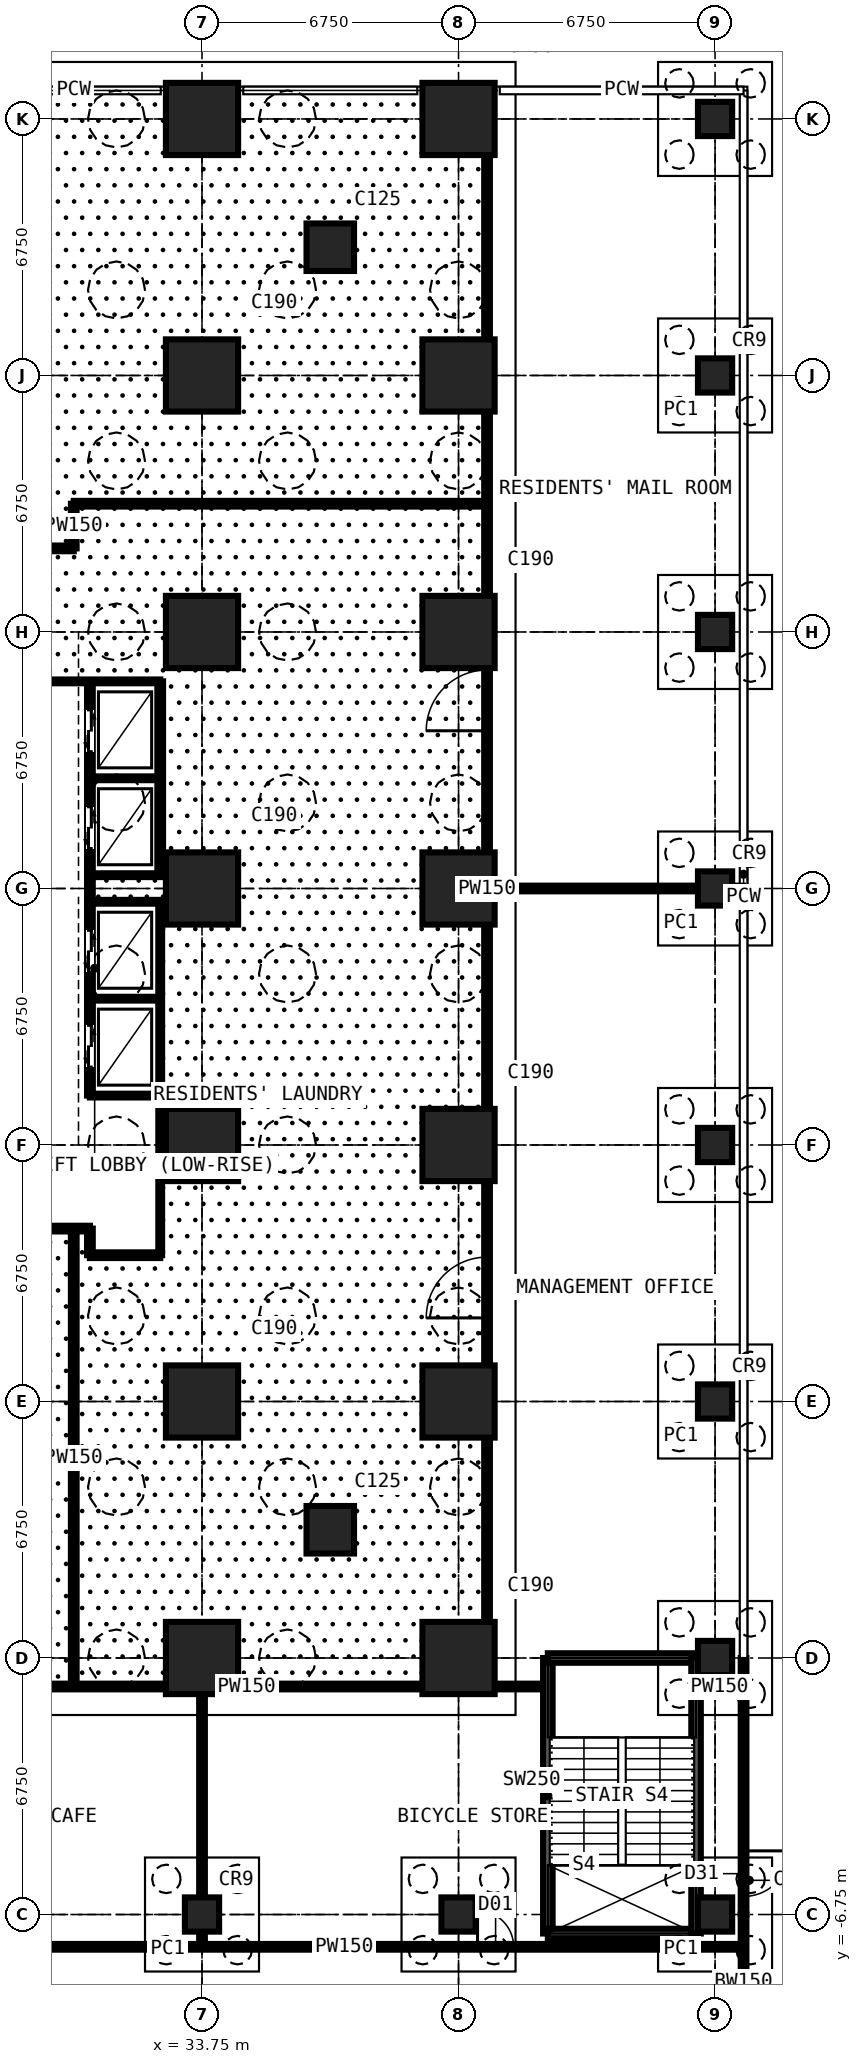
"""IFC4 building model, lengths in metres.
Left out: names, types, materials, properties, quantities, classifications, styles, units other than length and angle.
Written with IfcOpenShell. Run it as: python <this file> out.ifc"""

import sys

from ifc_helpers import new_model, si_unit, direction, frame, frame_2d, origin, origin_2d, place, context, subcontext, project, spatial, rectangle, circle, extrude, element, fill, save


model = new_model("IFC4")
c1 = context("Model", 3, precision=1e-05, world=origin(), true_north=direction((0.0, 1.0)))
c2 = subcontext(c1, "Body", "Model", "MODEL_VIEW")
j1 = project(units=[si_unit("LENGTHUNIT", "METRE"), si_unit("PLANEANGLEUNIT", "RADIAN")], contexts=[c1])
p1 = place(None, origin())
s1 = spatial("IfcSite", under=j1, at=p1, CompositionType="ELEMENT")
p2 = place(p1, origin())
s2 = spatial("IfcBuilding", under=s1, at=p2, CompositionType="ELEMENT")
p3 = place(p2, origin())
s3 = spatial("IfcBuildingStorey", under=s2, at=p3, CompositionType="ELEMENT", Elevation=0.0)
p4 = place(p3, frame((33.75, -6.75, 0.0), z_axis=(0.0, 0.0, 1.0), x_axis=(1.0, 0.0, 0.0)))
e1 = element("IfcColumn", 1, at=p4, inside=s3, PredefinedType="COLUMN", context=c2, shape_type="SweptSolid", body=[
    extrude(circle(Radius=0.45, at=origin_2d()), origin(), (0.0, 0.0, 1.0), 4.5),
])
for number, where, z_axis, x_axis in (
    (2, (33.75, 0.0, 0.0), (0.0, 0.0, 1.0), (1.0, 0.0, 0.0)),
    (3, (33.75, 6.75, 0.0), (0.0, 0.0, 1.0), (1.0, 0.0, 0.0)),
    (4, (33.75, 13.5, 0.0), (0.0, 0.0, 1.0), (1.0, 0.0, 0.0)),
    (5, (33.75, 20.25, 0.0), (0.0, 0.0, 1.0), (1.0, 0.0, 0.0)),
    (6, (33.75, 27.0, 0.0), (0.0, 0.0, 1.0), (1.0, 0.0, 0.0)),
    (7, (33.75, 33.75, 0.0), (0.0, 0.0, 1.0), (1.0, 0.0, 0.0)),
    (8, (33.75, 40.5, 0.0), (0.0, 0.0, 1.0), (1.0, 0.0, 0.0)),
):
    element("IfcColumn", number, at=place(p3, frame(where, z_axis=z_axis, x_axis=x_axis)), inside=s3, PredefinedType="COLUMN", context=c2, shape_type="SweptSolid", body=[
        extrude(rectangle(XDim=1.9, YDim=1.9, at=origin_2d()), origin(), (0.0, 0.0, 1.0), 4.5),
    ])
for number, where, z_axis, x_axis in (
    (9, (37.125, 3.375, 0.0), (0.0, 0.0, 1.0), (1.0, 0.0, 0.0)),
    (10, (37.125, 37.125, 0.0), (0.0, 0.0, 1.0), (1.0, 0.0, 0.0)),
):
    element("IfcColumn", number, at=place(p3, frame(where, z_axis=z_axis, x_axis=x_axis)), inside=s3, PredefinedType="COLUMN", context=c2, shape_type="SweptSolid", body=[
        extrude(rectangle(XDim=1.25, YDim=1.25, at=origin_2d()), origin(), (0.0, 0.0, 1.0), 4.5),
    ])
p5 = place(p3, frame((40.5, -6.75, 0.0), z_axis=(0.0, 0.0, 1.0), x_axis=(1.0, 0.0, 0.0)))
e11 = element("IfcColumn", 11, at=p5, inside=s3, PredefinedType="COLUMN", context=c2, shape_type="SweptSolid", body=[
    extrude(circle(Radius=0.45, at=origin_2d()), origin(), (0.0, 0.0, 1.0), 4.5),
])
for number, where, z_axis, x_axis in (
    (12, (40.5, 0.0, 0.0), (0.0, 0.0, 1.0), (1.0, 0.0, 0.0)),
    (13, (40.5, 6.75, 0.0), (0.0, 0.0, 1.0), (1.0, 0.0, 0.0)),
    (14, (40.5, 13.5, 0.0), (0.0, 0.0, 1.0), (1.0, 0.0, 0.0)),
    (15, (40.5, 20.25, 0.0), (0.0, 0.0, 1.0), (1.0, 0.0, 0.0)),
    (16, (40.5, 27.0, 0.0), (0.0, 0.0, 1.0), (1.0, 0.0, 0.0)),
    (17, (40.5, 33.75, 0.0), (0.0, 0.0, 1.0), (1.0, 0.0, 0.0)),
    (18, (40.5, 40.5, 0.0), (0.0, 0.0, 1.0), (1.0, 0.0, 0.0)),
):
    element("IfcColumn", number, at=place(p3, frame(where, z_axis=z_axis, x_axis=x_axis)), inside=s3, PredefinedType="COLUMN", context=c2, shape_type="SweptSolid", body=[
        extrude(rectangle(XDim=1.9, YDim=1.9, at=origin_2d()), origin(), (0.0, 0.0, 1.0), 4.5),
    ])
for number, where, z_axis, x_axis in (
    (19, (47.25, -6.75, 0.0), (0.0, 0.0, 1.0), (1.0, 0.0, 0.0)),
    (20, (47.25, 0.0, 0.0), (0.0, 0.0, 1.0), (1.0, 0.0, 0.0)),
    (21, (47.25, 6.75, 0.0), (0.0, 0.0, 1.0), (1.0, 0.0, 0.0)),
    (22, (47.25, 13.5, 0.0), (0.0, 0.0, 1.0), (1.0, 0.0, 0.0)),
    (23, (47.25, 20.25, 0.0), (0.0, 0.0, 1.0), (1.0, 0.0, 0.0)),
    (24, (47.25, 27.0, 0.0), (0.0, 0.0, 1.0), (1.0, 0.0, 0.0)),
    (25, (47.25, 33.75, 0.0), (0.0, 0.0, 1.0), (1.0, 0.0, 0.0)),
    (26, (47.25, 40.5, 0.0), (0.0, 0.0, 1.0), (1.0, 0.0, 0.0)),
):
    element("IfcColumn", number, at=place(p3, frame(where, z_axis=z_axis, x_axis=x_axis)), inside=s3, PredefinedType="COLUMN", context=c2, shape_type="SweptSolid", body=[
        extrude(circle(Radius=0.45, at=origin_2d()), origin(), (0.0, 0.0, 1.0), 4.5),
    ])
p6 = place(p3, frame((48.0, -6.75, 0.0), z_axis=(0.0, 0.0, 1.0), x_axis=(0.0, -1.0, 0.0)))
e27 = element("IfcWall", 27, at=p6, inside=s3, PredefinedType="SOLIDWALL", context=c2, shape_type="SweptSolid", body=[
    extrude(rectangle(XDim=6.75, YDim=0.15, at=frame_2d((3.375, 0.0))), origin(), (0.0, 0.0, 1.0), 4.25),
])
p7 = place(p6, frame((2.625, 0.0, 0.0)))
e28 = element("IfcOpeningElement", 28, at=p7, cuts=e27, PredefinedType="OPENING", context=c2, shape_type="SweptSolid", body=[
    extrude(rectangle(XDim=1.5, YDim=2.4, at=frame_2d((0.75, 1.2))), frame((0.0, 0.085, 0.0), z_axis=(0.0, -1.0, 0.0), x_axis=(1.0, 0.0, 0.0)), (0.0, 0.0, 1.0), 0.17),
])
p8 = place(p3, frame((48.0, 0.0, 0.0), z_axis=(0.0, 0.0, 1.0), x_axis=(0.0, -1.0, 0.0)))
e29 = element("IfcWall", 29, at=p8, inside=s3, PredefinedType="SOLIDWALL", context=c2, shape_type="SweptSolid", body=[
    extrude(rectangle(XDim=6.75, YDim=0.15, at=frame_2d((3.375, 0.0))), origin(), (0.0, 0.0, 1.0), 4.25),
])
p9 = place(p8, frame((5.075, 0.0, 0.0)))
e30 = element("IfcOpeningElement", 30, at=p9, cuts=e29, PredefinedType="OPENING", context=c2, shape_type="SweptSolid", body=[
    extrude(rectangle(XDim=1.2, YDim=2.4, at=frame_2d((0.6, 1.2))), frame((0.0, 0.085, 0.0), z_axis=(0.0, -1.0, 0.0), x_axis=(1.0, 0.0, 0.0)), (0.0, 0.0, 1.0), 0.17),
])
p10 = place(p3, frame((8.9, 29.2, 0.0), z_axis=(0.0, 0.0, 1.0), x_axis=(1.0, 0.0, 0.0)))
e31 = element("IfcWall", 31, at=p10, inside=s3, PredefinedType="PARTITIONING", context=c2, shape_type="SweptSolid", body=[
    extrude(rectangle(XDim=21.475, YDim=0.15, at=frame_2d((10.738, 0.0))), origin(), (0.0, 0.0, 1.0), 4.25),
])
p11 = place(p10, frame((10.55, 0.0, 0.0)))
e32 = element("IfcOpeningElement", 32, at=p11, cuts=e31, PredefinedType="OPENING", context=c2, shape_type="SweptSolid", body=[
    extrude(rectangle(XDim=1.6, YDim=2.4, at=frame_2d((0.8, 1.2))), frame((0.0, 0.085, 0.0), z_axis=(0.0, -1.0, 0.0), x_axis=(1.0, 0.0, 0.0)), (0.0, 0.0, 1.0), 0.17),
])
p12 = place(p3, frame((10.125, 11.3, 0.0), z_axis=(0.0, 0.0, 1.0), x_axis=(1.0, 0.0, 0.0)))
e33 = element("IfcWall", 33, at=p12, inside=s3, PredefinedType="PARTITIONING", context=c2, shape_type="SweptSolid", body=[
    extrude(rectangle(XDim=20.675, YDim=0.15, at=frame_2d((10.337, 0.0))), origin(), (0.0, 0.0, 1.0), 4.25),
])
p13 = place(p12, frame((9.325, 0.0, 0.0)))
e34 = element("IfcOpeningElement", 34, at=p13, cuts=e33, PredefinedType="OPENING", context=c2, shape_type="SweptSolid", body=[
    extrude(rectangle(XDim=1.6, YDim=2.4, at=frame_2d((0.8, 1.2))), frame((0.0, 0.085, 0.0), z_axis=(0.0, -1.0, 0.0), x_axis=(1.0, 0.0, 0.0)), (0.0, 0.0, 1.0), 0.17),
])
p14 = place(p3, frame((27.0, -7.6, 0.0), z_axis=(0.0, 0.0, 1.0), x_axis=(1.0, 0.0, 0.0)))
e35 = element("IfcWall", 35, at=p14, inside=s3, PredefinedType="PARTITIONING", context=c2, shape_type="SweptSolid", body=[
    extrude(rectangle(XDim=20.984, YDim=0.15, at=frame_2d((10.492, 0.0))), origin(), (0.0, 0.0, 1.0), 4.25),
])
p15 = place(p14, frame((14.0, 0.0, 0.0)))
e36 = element("IfcOpeningElement", 36, at=p15, cuts=e35, PredefinedType="OPENING", context=c2, shape_type="SweptSolid", body=[
    extrude(rectangle(XDim=0.95, YDim=2.2, at=frame_2d((0.475, 1.1))), frame((0.0, 0.085, 0.0), z_axis=(0.0, -1.0, 0.0), x_axis=(1.0, 0.0, 0.0)), (0.0, 0.0, 1.0), 0.17),
])
p16 = place(p3, frame((27.0, -0.75, 0.0), z_axis=(0.0, 0.0, 1.0), x_axis=(1.0, 0.0, 0.0)))
e37 = element("IfcWall", 37, at=p16, inside=s3, PredefinedType="PARTITIONING", context=c2, shape_type="SweptSolid", body=[
    extrude(rectangle(XDim=15.85, YDim=0.15, at=frame_2d((7.925, 0.0))), origin(), (0.0, 0.0, 1.0), 4.25),
])
p17 = place(p3, frame((29.2, 25.7, 0.0), z_axis=(0.0, 0.0, 1.0), x_axis=(1.0, 0.0, 0.0)))
e38 = element("IfcWall", 38, at=p17, inside=s3, PredefinedType="SHEAR", context=c2, shape_type="SweptSolid", body=[
    extrude(rectangle(XDim=3.45, YDim=0.1, at=frame_2d((1.725, 0.0))), origin(), (0.0, 0.0, 1.0), 4.25),
])
p18 = place(p3, frame((30.375, -0.75, 0.0), z_axis=(0.0, 0.0, 1.0), x_axis=(0.0, 1.0, 0.0)))
e39 = element("IfcWall", 39, at=p18, inside=s3, PredefinedType="PARTITIONING", context=c2, shape_type="SweptSolid", body=[
    extrude(rectangle(XDim=12.05, YDim=0.15, at=frame_2d((6.025, 0.0))), origin(), (0.0, 0.0, 1.0), 4.25),
])
p19 = place(p3, frame((30.375, 29.2, 0.0), z_axis=(0.0, 0.0, 1.0), x_axis=(0.0, 1.0, 0.0)))
e40 = element("IfcWall", 40, at=p19, inside=s3, PredefinedType="PARTITIONING", context=c2, shape_type="SweptSolid", body=[
    extrude(rectangle(XDim=1.175, YDim=0.15, at=frame_2d((0.587, 0.0))), origin(), (0.0, 0.0, 1.0), 4.25),
])
p20 = place(p3, frame((30.375, 30.375, 0.0), z_axis=(0.0, 0.0, 1.0), x_axis=(1.0, 0.0, 0.0)))
e41 = element("IfcWall", 41, at=p20, inside=s3, PredefinedType="PARTITIONING", context=c2, shape_type="SweptSolid", body=[
    extrude(rectangle(XDim=10.875, YDim=0.15, at=frame_2d((5.438, 0.0))), origin(), (0.0, 0.0, 1.0), 4.25),
])
p21 = place(p3, frame((30.8, 10.6, 0.0), z_axis=(0.0, 0.0, 1.0), x_axis=(0.0, 1.0, 0.0)))
e42 = element("IfcWall", 42, at=p21, inside=s3, PredefinedType="PARTITIONING", context=c2, shape_type="SweptSolid", body=[
    extrude(rectangle(XDim=0.7, YDim=0.15, at=frame_2d((0.35, 0.0))), origin(), (0.0, 0.0, 1.0), 4.25),
])
p22 = place(p3, frame((30.8, 10.6, 0.0), z_axis=(0.0, 0.0, 1.0), x_axis=(1.0, 0.0, 0.0)))
e43 = element("IfcWall", 43, at=p22, inside=s3, PredefinedType="PARTITIONING", context=c2, shape_type="SweptSolid", body=[
    extrude(rectangle(XDim=1.85, YDim=0.15, at=frame_2d((0.925, 0.0))), origin(), (0.0, 0.0, 1.0), 4.25),
])
p23 = place(p3, frame((30.8, 14.8, 0.0), z_axis=(0.0, 0.0, 1.0), x_axis=(0.0, 1.0, 0.0)))
e44 = element("IfcWall", 44, at=p23, inside=s3, PredefinedType="PARTITIONING", context=c2, shape_type="SweptSolid", body=[
    extrude(rectangle(XDim=10.9, YDim=0.15, at=frame_2d((5.45, 0.0))), origin(), (0.0, 0.0, 1.0), 4.25),
])
p24 = place(p23, frame((0.75, 0.0, 0.0)))
e45 = element("IfcOpeningElement", 45, at=p24, cuts=e44, PredefinedType="OPENING", context=c2, shape_type="SweptSolid", body=[
    extrude(rectangle(XDim=1.1, YDim=2.2, at=frame_2d((0.55, 1.1))), frame((0.0, 0.085, 0.0), z_axis=(0.0, -1.0, 0.0), x_axis=(1.0, 0.0, 0.0)), (0.0, 0.0, 1.0), 0.17),
])
p25 = place(p23, frame((3.25, 0.0, 0.0)))
e46 = element("IfcOpeningElement", 46, at=p25, cuts=e44, PredefinedType="OPENING", context=c2, shape_type="SweptSolid", body=[
    extrude(rectangle(XDim=1.1, YDim=2.2, at=frame_2d((0.55, 1.1))), frame((0.0, 0.085, 0.0), z_axis=(0.0, -1.0, 0.0), x_axis=(1.0, 0.0, 0.0)), (0.0, 0.0, 1.0), 0.17),
])
p26 = place(p23, frame((6.5, 0.0, 0.0)))
e47 = element("IfcOpeningElement", 47, at=p26, cuts=e44, PredefinedType="OPENING", context=c2, shape_type="SweptSolid", body=[
    extrude(rectangle(XDim=1.1, YDim=2.2, at=frame_2d((0.55, 1.1))), frame((0.0, 0.085, 0.0), z_axis=(0.0, -1.0, 0.0), x_axis=(1.0, 0.0, 0.0)), (0.0, 0.0, 1.0), 0.17),
])
p27 = place(p23, frame((9.05, 0.0, 0.0)))
e48 = element("IfcOpeningElement", 48, at=p27, cuts=e44, PredefinedType="OPENING", context=c2, shape_type="SweptSolid", body=[
    extrude(rectangle(XDim=1.1, YDim=2.2, at=frame_2d((0.55, 1.1))), frame((0.0, 0.085, 0.0), z_axis=(0.0, -1.0, 0.0), x_axis=(1.0, 0.0, 0.0)), (0.0, 0.0, 1.0), 0.17),
])
for number, where, z_axis, x_axis in (
    (49, (30.8, 14.8, 0.0), (0.0, 0.0, 1.0), (1.0, 0.0, 0.0)),
    (50, (30.8, 17.35, 0.0), (0.0, 0.0, 1.0), (1.0, 0.0, 0.0)),
    (51, (30.8, 19.9, 0.0), (0.0, 0.0, 1.0), (1.0, 0.0, 0.0)),
    (52, (30.8, 20.6, 0.0), (0.0, 0.0, 1.0), (1.0, 0.0, 0.0)),
    (53, (30.8, 23.15, 0.0), (0.0, 0.0, 1.0), (1.0, 0.0, 0.0)),
):
    element("IfcWall", number, at=place(p3, frame(where, z_axis=z_axis, x_axis=x_axis)), inside=s3, PredefinedType="SHEAR", context=c2, shape_type="SweptSolid", body=[
        extrude(rectangle(XDim=1.85, YDim=0.1, at=frame_2d((0.925, 0.0))), origin(), (0.0, 0.0, 1.0), 4.25),
    ])
p28 = place(p3, frame((32.65, 10.6, 0.0), z_axis=(0.0, 0.0, 1.0), x_axis=(0.0, 1.0, 0.0)))
e54 = element("IfcWall", 54, at=p28, inside=s3, PredefinedType="SHEAR", context=c2, shape_type="SweptSolid", body=[
    extrude(rectangle(XDim=9.3, YDim=0.1, at=frame_2d((4.65, 0.0))), origin(), (0.0, 0.0, 1.0), 4.25),
])
p29 = place(p3, frame((32.65, 20.6, 0.0), z_axis=(0.0, 0.0, 1.0), x_axis=(0.0, 1.0, 0.0)))
e55 = element("IfcWall", 55, at=p29, inside=s3, PredefinedType="PARTITIONING", context=c2, shape_type="SweptSolid", body=[
    extrude(rectangle(XDim=5.1, YDim=0.15, at=frame_2d((2.55, 0.0))), origin(), (0.0, 0.0, 1.0), 4.25),
])
p30 = place(p3, frame((33.75, -7.6, 0.0), z_axis=(0.0, 0.0, 1.0), x_axis=(0.0, 1.0, 0.0)))
e56 = element("IfcWall", 56, at=p30, inside=s3, PredefinedType="PARTITIONING", context=c2, shape_type="SweptSolid", body=[
    extrude(rectangle(XDim=6.85, YDim=0.15, at=frame_2d((3.425, 0.0))), origin(), (0.0, 0.0, 1.0), 3.752),
])
p31 = place(p3, frame((41.25, -0.75, 0.0), z_axis=(0.0, 0.0, 1.0), x_axis=(0.0, 1.0, 0.0)))
e57 = element("IfcWall", 57, at=p31, inside=s3, PredefinedType="PARTITIONING", context=c2, shape_type="SweptSolid", body=[
    extrude(rectangle(XDim=41.984, YDim=0.15, at=frame_2d((20.992, 0.0))), origin(), (0.0, 0.0, 1.0), 4.25),
])
p32 = place(p31, frame((9.7, 0.0, 0.0)))
e58 = element("IfcOpeningElement", 58, at=p32, cuts=e57, PredefinedType="OPENING", context=c2, shape_type="SweptSolid", body=[
    extrude(rectangle(XDim=1.6, YDim=2.4, at=frame_2d((0.8, 1.2))), frame((0.0, 0.085, 0.0), z_axis=(0.0, -1.0, 0.0), x_axis=(1.0, 0.0, 0.0)), (0.0, 0.0, 1.0), 0.17),
])
p33 = place(p31, frame((25.15, 0.0, 0.0)))
e59 = element("IfcOpeningElement", 59, at=p33, cuts=e57, PredefinedType="OPENING", context=c2, shape_type="SweptSolid", body=[
    extrude(rectangle(XDim=1.6, YDim=2.4, at=frame_2d((0.8, 1.2))), frame((0.0, 0.085, 0.0), z_axis=(0.0, -1.0, 0.0), x_axis=(1.0, 0.0, 0.0)), (0.0, 0.0, 1.0), 0.17),
])
p34 = place(p3, frame((41.25, 20.25, 0.0), z_axis=(0.0, 0.0, 1.0), x_axis=(1.0, 0.0, 0.0)))
e60 = element("IfcWall", 60, at=p34, inside=s3, PredefinedType="PARTITIONING", context=c2, shape_type="SweptSolid", body=[
    extrude(rectangle(XDim=6.734, YDim=0.15, at=frame_2d((3.367, 0.0))), origin(), (0.0, 0.0, 1.0), 3.752),
])
p35 = place(p3, frame((42.85, -7.25, 0.0), z_axis=(0.0, 0.0, 1.0), x_axis=(0.0, 1.0, 0.0)))
e61 = element("IfcWall", 61, at=p35, inside=s3, PredefinedType="SOLIDWALL", context=c2, shape_type="SweptSolid", body=[
    extrude(rectangle(XDim=7.25, YDim=0.25, at=frame_2d((3.625, 0.0))), origin(), (0.0, 0.0, 1.0), 4.25),
])
for number, where, z_axis, x_axis in (
    (62, (42.85, -7.25, 0.0), (0.0, 0.0, 1.0), (1.0, 0.0, 0.0)),
    (63, (42.85, 0.0, 0.0), (0.0, 0.0, 1.0), (1.0, 0.0, 0.0)),
):
    element("IfcWall", number, at=place(p3, frame(where, z_axis=z_axis, x_axis=x_axis)), inside=s3, PredefinedType="SOLIDWALL", context=c2, shape_type="SweptSolid", body=[
        extrude(rectangle(XDim=3.9, YDim=0.25, at=frame_2d((1.95, 0.0))), origin(), (0.0, 0.0, 1.0), 4.25),
    ])
p36 = place(p3, frame((46.75, -7.25, 0.0), z_axis=(0.0, 0.0, 1.0), x_axis=(0.0, 1.0, 0.0)))
e64 = element("IfcWall", 64, at=p36, inside=s3, PredefinedType="SOLIDWALL", context=c2, shape_type="SweptSolid", body=[
    extrude(rectangle(XDim=7.25, YDim=0.25, at=frame_2d((3.625, 0.0))), origin(), (0.0, 0.0, 1.0), 4.25),
])
p37 = place(p3, frame((46.75, -0.75, 0.0), z_axis=(0.0, 0.0, 1.0), x_axis=(1.0, 0.0, 0.0)))
e65 = element("IfcWall", 65, at=p37, inside=s3, PredefinedType="PARTITIONING", context=c2, shape_type="SweptSolid", body=[
    extrude(rectangle(XDim=1.234, YDim=0.15, at=frame_2d((0.617, 0.0))), origin(), (0.0, 0.0, 1.0), 4.25),
])
p38 = place(p9, origin())
e66 = element("IfcDoor", 66, at=p38, inside=s3, OperationType="SINGLE_SWING_LEFT", PredefinedType="DOOR", context=c2, shape_type="SweptSolid", body=[
    extrude(rectangle(XDim=1.2, YDim=2.4, at=frame_2d((0.6, 1.2))), frame((0.0, 0.025, 0.0), z_axis=(0.0, -1.0, 0.0), x_axis=(1.0, 0.0, 0.0)), (0.0, 0.0, 1.0), 0.05),
])
fill(e30, e66)
p39 = place(p15, origin())
e67 = element("IfcDoor", 67, at=p39, inside=s3, OperationType="SINGLE_SWING_LEFT", PredefinedType="DOOR", context=c2, shape_type="SweptSolid", body=[
    extrude(rectangle(XDim=0.95, YDim=2.2, at=frame_2d((0.475, 1.1))), frame((0.0, 0.025, 0.0), z_axis=(0.0, -1.0, 0.0), x_axis=(1.0, 0.0, 0.0)), (0.0, 0.0, 1.0), 0.05),
])
fill(e36, e67)
p40 = place(p32, origin())
e68 = element("IfcDoor", 68, at=p40, inside=s3, OperationType="DOUBLE_DOOR_SINGLE_SWING", PredefinedType="DOOR", context=c2, shape_type="SweptSolid", body=[
    extrude(rectangle(XDim=1.6, YDim=2.4, at=frame_2d((0.8, 1.2))), frame((0.0, 0.025, 0.0), z_axis=(0.0, -1.0, 0.0), x_axis=(1.0, 0.0, 0.0)), (0.0, 0.0, 1.0), 0.05),
])
fill(e58, e68)
p41 = place(p33, origin())
e69 = element("IfcDoor", 69, at=p41, inside=s3, OperationType="DOUBLE_DOOR_SINGLE_SWING", PredefinedType="DOOR", context=c2, shape_type="SweptSolid", body=[
    extrude(rectangle(XDim=1.6, YDim=2.4, at=frame_2d((0.8, 1.2))), frame((0.0, 0.025, 0.0), z_axis=(0.0, -1.0, 0.0), x_axis=(1.0, 0.0, 0.0)), (0.0, 0.0, 1.0), 0.05),
])
fill(e59, e69)
p42 = place(p24, origin())
e70 = element("IfcDoor", 70, at=p42, inside=s3, OperationType="DOUBLE_DOOR_SLIDING", PredefinedType="DOOR", context=c2, shape_type="SweptSolid", body=[
    extrude(rectangle(XDim=1.1, YDim=2.2, at=frame_2d((0.55, 1.1))), frame((0.0, 0.025, 0.0), z_axis=(0.0, -1.0, 0.0), x_axis=(1.0, 0.0, 0.0)), (0.0, 0.0, 1.0), 0.05),
])
fill(e45, e70)
p43 = place(p25, origin())
e71 = element("IfcDoor", 71, at=p43, inside=s3, OperationType="DOUBLE_DOOR_SLIDING", PredefinedType="DOOR", context=c2, shape_type="SweptSolid", body=[
    extrude(rectangle(XDim=1.1, YDim=2.2, at=frame_2d((0.55, 1.1))), frame((0.0, 0.025, 0.0), z_axis=(0.0, -1.0, 0.0), x_axis=(1.0, 0.0, 0.0)), (0.0, 0.0, 1.0), 0.05),
])
fill(e46, e71)
p44 = place(p26, origin())
e72 = element("IfcDoor", 72, at=p44, inside=s3, OperationType="DOUBLE_DOOR_SLIDING", PredefinedType="DOOR", context=c2, shape_type="SweptSolid", body=[
    extrude(rectangle(XDim=1.1, YDim=2.2, at=frame_2d((0.55, 1.1))), frame((0.0, 0.025, 0.0), z_axis=(0.0, -1.0, 0.0), x_axis=(1.0, 0.0, 0.0)), (0.0, 0.0, 1.0), 0.05),
])
fill(e47, e72)
p45 = place(p27, origin())
e73 = element("IfcDoor", 73, at=p45, inside=s3, OperationType="DOUBLE_DOOR_SLIDING", PredefinedType="DOOR", context=c2, shape_type="SweptSolid", body=[
    extrude(rectangle(XDim=1.1, YDim=2.2, at=frame_2d((0.55, 1.1))), frame((0.0, 0.025, 0.0), z_axis=(0.0, -1.0, 0.0), x_axis=(1.0, 0.0, 0.0)), (0.0, 0.0, 1.0), 0.05),
])
fill(e48, e73)
save(model, sys.argv[1])
